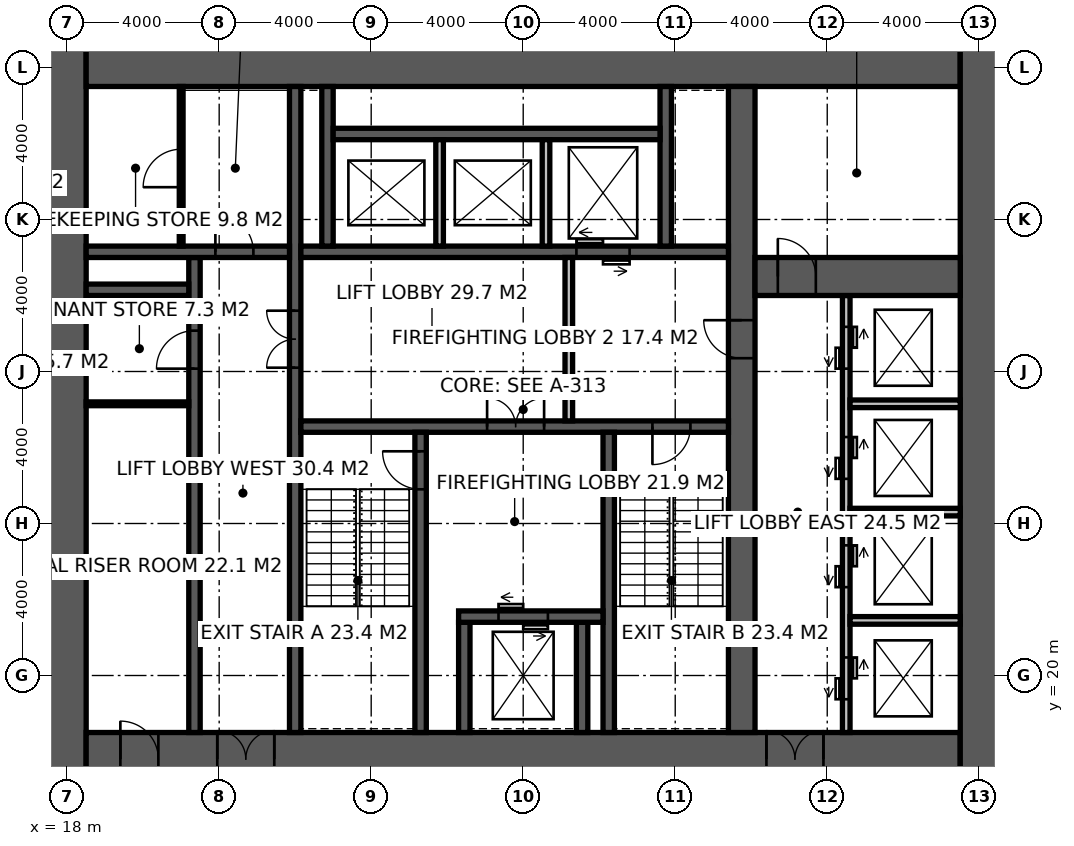
"""IFC4 building model, lengths in metres.
Left out: names, types, materials, properties, quantities, classifications, styles, units other than length and angle.
Written with IfcOpenShell. Run it as: python <this file> out.ifc"""

import sys

from ifc_helpers import new_model, si_unit, direction, frame, frame_2d, origin, place, context, subcontext, project, spatial, rectangle, extrude, element, fill, save


model = new_model("IFC4")
c1 = context("Model", 3, precision=1e-05, world=origin(), true_north=direction((0.0, 1.0)))
c2 = subcontext(c1, "Body", "Model", "MODEL_VIEW")
j1 = project(units=[si_unit("LENGTHUNIT", "METRE"), si_unit("PLANEANGLEUNIT", "RADIAN")], contexts=[c1])
p1 = place(None, origin())
s1 = spatial("IfcSite", under=j1, at=p1, CompositionType="ELEMENT")
p2 = place(p1, origin())
s2 = spatial("IfcBuilding", under=s1, at=p2, CompositionType="ELEMENT")
p3 = place(p2, frame((0.0, 0.0, 39.0)))
s3 = spatial("IfcBuildingStorey", under=s2, at=p3, CompositionType="ELEMENT", Elevation=39.0)
p4 = place(p3, frame((18.0, 17.1, -0.15), z_axis=(0.0, 0.0, 1.0), x_axis=(0.0, 1.0, 0.0)))
e1 = element("IfcWall", 1, at=p4, inside=s3, PredefinedType="SHEAR", context=c2, shape_type="SweptSolid", body=[
    extrude(rectangle(XDim=19.8, YDim=1.0, at=frame_2d((9.9, 0.0))), origin(), (0.0, 0.0, 1.0), 4.0),
])
p5 = place(p3, frame((18.5, 17.8, -0.15), z_axis=(0.0, 0.0, 1.0), x_axis=(1.0, 0.0, 0.0)))
e2 = element("IfcWall", 2, at=p5, inside=s3, PredefinedType="SHEAR", context=c2, shape_type="SweptSolid", body=[
    extrude(rectangle(XDim=23.0, YDim=1.4, at=frame_2d((11.5, 0.0))), origin(), (0.0, 0.0, 1.0), 4.0),
])
p6 = place(p5, frame((3.45, 0.0, 0.15)))
e3 = element("IfcOpeningElement", 3, at=p6, cuts=e2, PredefinedType="OPENING", context=c2, shape_type="SweptSolid", body=[
    extrude(rectangle(XDim=1.5, YDim=2.4, at=frame_2d((0.75, 1.2))), frame((0.0, 0.71, 0.0), z_axis=(0.0, -1.0, 0.0), x_axis=(1.0, 0.0, 0.0)), (0.0, 0.0, 1.0), 1.42),
])
p7 = place(p5, frame((17.9, 0.0, 0.15)))
e4 = element("IfcOpeningElement", 4, at=p7, cuts=e2, PredefinedType="OPENING", context=c2, shape_type="SweptSolid", body=[
    extrude(rectangle(XDim=1.5, YDim=2.4, at=frame_2d((0.75, 1.2))), frame((0.0, 0.71, 0.0), z_axis=(0.0, -1.0, 0.0), x_axis=(1.0, 0.0, 0.0)), (0.0, 0.0, 1.0), 1.42),
])
p8 = place(p5, frame((0.9, 0.0, 0.15)))
e5 = element("IfcOpeningElement", 5, at=p8, cuts=e2, PredefinedType="OPENING", context=c2, shape_type="SweptSolid", body=[
    extrude(rectangle(XDim=1.0, YDim=2.2, at=frame_2d((0.5, 1.1))), frame((0.0, 0.71, 0.0), z_axis=(0.0, -1.0, 0.0), x_axis=(1.0, 0.0, 0.0)), (0.0, 0.0, 1.0), 1.42),
])
p9 = place(p3, frame((18.5, 36.2, -0.15), z_axis=(0.0, 0.0, 1.0), x_axis=(1.0, 0.0, 0.0)))
e6 = element("IfcWall", 6, at=p9, inside=s3, PredefinedType="SHEAR", context=c2, shape_type="SweptSolid", body=[
    extrude(rectangle(XDim=23.0, YDim=1.4, at=frame_2d((11.5, 0.0))), origin(), (0.0, 0.0, 1.0), 4.0),
])
p10 = place(p3, frame((42.0, 17.1, -0.15), z_axis=(0.0, 0.0, 1.0), x_axis=(0.0, 1.0, 0.0)))
e7 = element("IfcWall", 7, at=p10, inside=s3, PredefinedType="SHEAR", context=c2, shape_type="SweptSolid", body=[
    extrude(rectangle(XDim=19.8, YDim=1.0, at=frame_2d((9.9, 0.0))), origin(), (0.0, 0.0, 1.0), 4.0),
])
p11 = place(p3, frame((35.75, 18.5, -0.15), z_axis=(0.0, 0.0, 1.0), x_axis=(0.0, 1.0, 0.0)))
e8 = element("IfcWall", 8, at=p11, inside=s3, PredefinedType="SHEAR", context=c2, shape_type="SweptSolid", body=[
    extrude(rectangle(XDim=17.0, YDim=0.7, at=frame_2d((8.5, 0.0))), origin(), (0.0, 0.0, 1.0), 4.0),
])
p12 = place(p11, frame((9.85, 0.0, 0.15)))
e9 = element("IfcOpeningElement", 9, at=p12, cuts=e8, PredefinedType="OPENING", context=c2, shape_type="SweptSolid", body=[
    extrude(rectangle(XDim=1.0, YDim=2.2, at=frame_2d((0.5, 1.1))), frame((0.0, 0.36, 0.0), z_axis=(0.0, -1.0, 0.0), x_axis=(1.0, 0.0, 0.0)), (0.0, 0.0, 1.0), 0.72),
])
p13 = place(p3, frame((24.0, 18.5, -0.15), z_axis=(0.0, 0.0, 1.0), x_axis=(0.0, 1.0, 0.0)))
e10 = element("IfcWall", 10, at=p13, inside=s3, PredefinedType="SHEAR", context=c2, shape_type="SweptSolid", body=[
    extrude(rectangle(XDim=17.0, YDim=0.3, at=frame_2d((8.5, 0.0))), origin(), (0.0, 0.0, 1.0), 4.0),
])
p14 = place(p13, frame((9.6, 0.0, 0.15)))
e11 = element("IfcOpeningElement", 11, at=p14, cuts=e10, PredefinedType="OPENING", context=c2, shape_type="SweptSolid", body=[
    extrude(rectangle(XDim=1.5, YDim=2.4, at=frame_2d((0.75, 1.2))), frame((0.0, 0.16, 0.0), z_axis=(0.0, -1.0, 0.0), x_axis=(1.0, 0.0, 0.0)), (0.0, 0.0, 1.0), 0.32),
])
p15 = place(p3, frame((24.15, 26.55, -0.15), z_axis=(0.0, 0.0, 1.0), x_axis=(1.0, 0.0, 0.0)))
e12 = element("IfcWall", 12, at=p15, inside=s3, PredefinedType="SHEAR", context=c2, shape_type="SweptSolid", body=[
    extrude(rectangle(XDim=11.25, YDim=0.3, at=frame_2d((5.625, 0.0))), origin(), (0.0, 0.0, 1.0), 4.0),
])
p16 = place(p15, frame((9.25, 0.0, 0.15)))
e13 = element("IfcOpeningElement", 13, at=p16, cuts=e12, PredefinedType="OPENING", context=c2, shape_type="SweptSolid", body=[
    extrude(rectangle(XDim=1.0, YDim=2.2, at=frame_2d((0.5, 1.1))), frame((0.0, 0.16, 0.0), z_axis=(0.0, -1.0, 0.0), x_axis=(1.0, 0.0, 0.0)), (0.0, 0.0, 1.0), 0.32),
])
p17 = place(p15, frame((4.9, 0.0, 0.15)))
e14 = element("IfcOpeningElement", 14, at=p17, cuts=e12, PredefinedType="OPENING", context=c2, shape_type="SweptSolid", body=[
    extrude(rectangle(XDim=1.5, YDim=2.4, at=frame_2d((0.75, 1.2))), frame((0.0, 0.16, 0.0), z_axis=(0.0, -1.0, 0.0), x_axis=(1.0, 0.0, 0.0)), (0.0, 0.0, 1.0), 0.32),
])
p18 = place(p3, frame((27.3, 18.5, -0.15), z_axis=(0.0, 0.0, 1.0), x_axis=(0.0, 1.0, 0.0)))
e15 = element("IfcWall", 15, at=p18, inside=s3, PredefinedType="SHEAR", context=c2, shape_type="SweptSolid", body=[
    extrude(rectangle(XDim=7.9, YDim=0.3, at=frame_2d((3.95, 0.0))), origin(), (0.0, 0.0, 1.0), 4.0),
])
p19 = place(p18, frame((6.4, 0.0, 0.15)))
e16 = element("IfcOpeningElement", 16, at=p19, cuts=e15, PredefinedType="OPENING", context=c2, shape_type="SweptSolid", body=[
    extrude(rectangle(XDim=1.0, YDim=2.2, at=frame_2d((0.5, 1.1))), frame((0.0, 0.16, 0.0), z_axis=(0.0, -1.0, 0.0), x_axis=(1.0, 0.0, 0.0)), (0.0, 0.0, 1.0), 0.32),
])
p20 = place(p3, frame((32.25, 18.5, -0.15), z_axis=(0.0, 0.0, 1.0), x_axis=(0.0, 1.0, 0.0)))
e17 = element("IfcWall", 17, at=p20, inside=s3, PredefinedType="SHEAR", context=c2, shape_type="SweptSolid", body=[
    extrude(rectangle(XDim=7.9, YDim=0.3, at=frame_2d((3.95, 0.0))), origin(), (0.0, 0.0, 1.0), 4.0),
])
for number, where, z_axis, x_axis in (
    (18, (28.45, 18.5, -0.15), (0.0, 0.0, 1.0), (0.0, 1.0, 0.0)),
    (19, (31.55, 18.5, -0.15), (0.0, 0.0, 1.0), (0.0, 1.0, 0.0)),
):
    element("IfcWall", number, at=place(p3, frame(where, z_axis=z_axis, x_axis=x_axis)), inside=s3, PredefinedType="SHEAR", context=c2, shape_type="SweptSolid", body=[
        extrude(rectangle(XDim=2.9, YDim=0.3, at=frame_2d((1.45, 0.0))), origin(), (0.0, 0.0, 1.0), 4.0),
    ])
p21 = place(p3, frame((28.3, 21.55, -0.15), z_axis=(0.0, 0.0, 1.0), x_axis=(1.0, 0.0, 0.0)))
e20 = element("IfcWall", 20, at=p21, inside=s3, PredefinedType="SHEAR", context=c2, shape_type="SweptSolid", body=[
    extrude(rectangle(XDim=3.8, YDim=0.3, at=frame_2d((1.9, 0.0))), origin(), (0.0, 0.0, 1.0), 4.0),
])
p22 = place(p21, frame((1.05, 0.0, 0.15)))
e21 = element("IfcOpeningElement", 21, at=p22, cuts=e20, PredefinedType="OPENING", context=c2, shape_type="SweptSolid", body=[
    extrude(rectangle(XDim=1.3, YDim=2.4, at=frame_2d((0.65, 1.2))), frame((0.0, 0.16, 0.0), z_axis=(0.0, -1.0, 0.0), x_axis=(1.0, 0.0, 0.0)), (0.0, 0.0, 1.0), 0.32),
])
p23 = place(p3, frame((24.15, 31.15, -0.15), z_axis=(0.0, 0.0, 1.0), x_axis=(1.0, 0.0, 0.0)))
e22 = element("IfcWall", 22, at=p23, inside=s3, PredefinedType="SHEAR", context=c2, shape_type="SweptSolid", body=[
    extrude(rectangle(XDim=11.25, YDim=0.3, at=frame_2d((5.625, 0.0))), origin(), (0.0, 0.0, 1.0), 4.0),
])
p24 = place(p23, frame((7.25, 0.0, 0.15)))
e23 = element("IfcOpeningElement", 23, at=p24, cuts=e22, PredefinedType="OPENING", context=c2, shape_type="SweptSolid", body=[
    extrude(rectangle(XDim=1.4, YDim=2.4, at=frame_2d((0.7, 1.2))), frame((0.0, 0.16, 0.0), z_axis=(0.0, -1.0, 0.0), x_axis=(1.0, 0.0, 0.0)), (0.0, 0.0, 1.0), 0.32),
])
p25 = place(p3, frame((21.35, 18.5, -0.15), z_axis=(0.0, 0.0, 1.0), x_axis=(0.0, 1.0, 0.0)))
e24 = element("IfcWall", 24, at=p25, inside=s3, PredefinedType="SHEAR", context=c2, shape_type="SweptSolid", body=[
    extrude(rectangle(XDim=12.5, YDim=0.3, at=frame_2d((6.25, 0.0))), origin(), (0.0, 0.0, 1.0), 4.0),
])
p26 = place(p25, frame((9.575, 0.0, 0.15)))
e25 = element("IfcOpeningElement", 25, at=p26, cuts=e24, PredefinedType="OPENING", context=c2, shape_type="SweptSolid", body=[
    extrude(rectangle(XDim=1.0, YDim=2.2, at=frame_2d((0.5, 1.1))), frame((0.0, 0.16, 0.0), z_axis=(0.0, -1.0, 0.0), x_axis=(1.0, 0.0, 0.0)), (0.0, 0.0, 1.0), 0.32),
])
p27 = place(p3, frame((18.5, 31.15, -0.15), z_axis=(0.0, 0.0, 1.0), x_axis=(1.0, 0.0, 0.0)))
e26 = element("IfcWall", 26, at=p27, inside=s3, PredefinedType="SHEAR", context=c2, shape_type="SweptSolid", body=[
    extrude(rectangle(XDim=5.35, YDim=0.3, at=frame_2d((2.675, 0.0))), origin(), (0.0, 0.0, 1.0), 4.0),
])
p28 = place(p27, frame((3.4, 0.0, 0.15)))
e27 = element("IfcOpeningElement", 27, at=p28, cuts=e26, PredefinedType="OPENING", context=c2, shape_type="SweptSolid", body=[
    extrude(rectangle(XDim=1.0, YDim=2.2, at=frame_2d((0.5, 1.1))), frame((0.0, 0.16, 0.0), z_axis=(0.0, -1.0, 0.0), x_axis=(1.0, 0.0, 0.0)), (0.0, 0.0, 1.0), 0.32),
])
p29 = place(p3, frame((18.5, 30.15, -0.15), z_axis=(0.0, 0.0, 1.0), x_axis=(1.0, 0.0, 0.0)))
e28 = element("IfcWall", 28, at=p29, inside=s3, PredefinedType="SHEAR", context=c2, shape_type="SweptSolid", body=[
    extrude(rectangle(XDim=2.7, YDim=0.3, at=frame_2d((1.35, 0.0))), origin(), (0.0, 0.0, 1.0), 4.0),
])
for number, where, z_axis, x_axis in (
    (29, (24.85, 31.3, -0.15), (0.0, 0.0, 1.0), (0.0, 1.0, 0.0)),
    (30, (33.75, 31.3, -0.15), (0.0, 0.0, 1.0), (0.0, 1.0, 0.0)),
):
    element("IfcWall", number, at=place(p3, frame(where, z_axis=z_axis, x_axis=x_axis)), inside=s3, PredefinedType="SHEAR", context=c2, shape_type="SweptSolid", body=[
        extrude(rectangle(XDim=4.2, YDim=0.3, at=frame_2d((2.1, 0.0))), origin(), (0.0, 0.0, 1.0), 4.0),
    ])
p30 = place(p3, frame((25.0, 34.25, -0.15), z_axis=(0.0, 0.0, 1.0), x_axis=(1.0, 0.0, 0.0)))
e31 = element("IfcWall", 31, at=p30, inside=s3, PredefinedType="SHEAR", context=c2, shape_type="SweptSolid", body=[
    extrude(rectangle(XDim=8.6, YDim=0.3, at=frame_2d((4.3, 0.0))), origin(), (0.0, 0.0, 1.0), 4.0),
])
for number, where, z_axis, x_axis in (
    (32, (27.8, 31.3, -0.15), (0.0, 0.0, 1.0), (0.0, 1.0, 0.0)),
    (33, (30.6, 31.3, -0.15), (0.0, 0.0, 1.0), (0.0, 1.0, 0.0)),
):
    element("IfcWall", number, at=place(p3, frame(where, z_axis=z_axis, x_axis=x_axis)), inside=s3, PredefinedType="SOLIDWALL", context=c2, shape_type="SweptSolid", body=[
        extrude(rectangle(XDim=2.8, YDim=0.2, at=frame_2d((1.4, 0.0))), origin(), (0.0, 0.0, 1.0), 4.0),
    ])
p31 = place(p3, frame((38.5, 18.5, -0.15), z_axis=(0.0, 0.0, 1.0), x_axis=(0.0, 1.0, 0.0)))
e34 = element("IfcWall", 34, at=p31, inside=s3, PredefinedType="SOLIDWALL", context=c2, shape_type="SweptSolid", body=[
    extrude(rectangle(XDim=11.5, YDim=0.2, at=frame_2d((5.75, 0.0))), origin(), (0.0, 0.0, 1.0), 4.0),
])
p32 = place(p31, frame((0.875, 0.0, 0.15)))
e35 = element("IfcOpeningElement", 35, at=p32, cuts=e34, PredefinedType="OPENING", context=c2, shape_type="SweptSolid", body=[
    extrude(rectangle(XDim=1.1, YDim=2.2, at=frame_2d((0.55, 1.1))), frame((0.0, 0.11, 0.0), z_axis=(0.0, -1.0, 0.0), x_axis=(1.0, 0.0, 0.0)), (0.0, 0.0, 1.0), 0.22),
])
p33 = place(p31, frame((3.825, 0.0, 0.15)))
e36 = element("IfcOpeningElement", 36, at=p33, cuts=e34, PredefinedType="OPENING", context=c2, shape_type="SweptSolid", body=[
    extrude(rectangle(XDim=1.1, YDim=2.2, at=frame_2d((0.55, 1.1))), frame((0.0, 0.11, 0.0), z_axis=(0.0, -1.0, 0.0), x_axis=(1.0, 0.0, 0.0)), (0.0, 0.0, 1.0), 0.22),
])
p34 = place(p31, frame((6.675, 0.0, 0.15)))
e37 = element("IfcOpeningElement", 37, at=p34, cuts=e34, PredefinedType="OPENING", context=c2, shape_type="SweptSolid", body=[
    extrude(rectangle(XDim=1.1, YDim=2.2, at=frame_2d((0.55, 1.1))), frame((0.0, 0.11, 0.0), z_axis=(0.0, -1.0, 0.0), x_axis=(1.0, 0.0, 0.0)), (0.0, 0.0, 1.0), 0.22),
])
p35 = place(p31, frame((9.575, 0.0, 0.15)))
e38 = element("IfcOpeningElement", 38, at=p35, cuts=e34, PredefinedType="OPENING", context=c2, shape_type="SweptSolid", body=[
    extrude(rectangle(XDim=1.1, YDim=2.2, at=frame_2d((0.55, 1.1))), frame((0.0, 0.11, 0.0), z_axis=(0.0, -1.0, 0.0), x_axis=(1.0, 0.0, 0.0)), (0.0, 0.0, 1.0), 0.22),
])
p36 = place(p3, frame((36.1, 30.5, -0.15), z_axis=(0.0, 0.0, 1.0), x_axis=(1.0, 0.0, 0.0)))
e39 = element("IfcWall", 39, at=p36, inside=s3, PredefinedType="SHEAR", context=c2, shape_type="SweptSolid", body=[
    extrude(rectangle(XDim=5.4, YDim=1.0, at=frame_2d((2.7, 0.0))), origin(), (0.0, 0.0, 1.0), 4.0),
])
p37 = place(p36, frame((0.6, 0.0, 0.15)))
e40 = element("IfcOpeningElement", 40, at=p37, cuts=e39, PredefinedType="OPENING", context=c2, shape_type="SweptSolid", body=[
    extrude(rectangle(XDim=1.0, YDim=2.2, at=frame_2d((0.5, 1.1))), frame((0.0, 0.51, 0.0), z_axis=(0.0, -1.0, 0.0), x_axis=(1.0, 0.0, 0.0)), (0.0, 0.0, 1.0), 1.02),
])
for number, where, z_axis, x_axis in (
    (41, (38.6, 21.45, -0.15), (0.0, 0.0, 1.0), (1.0, 0.0, 0.0)),
    (42, (38.6, 24.3, -0.15), (0.0, 0.0, 1.0), (1.0, 0.0, 0.0)),
    (43, (38.6, 27.15, -0.15), (0.0, 0.0, 1.0), (1.0, 0.0, 0.0)),
):
    element("IfcWall", number, at=place(p3, frame(where, z_axis=z_axis, x_axis=x_axis)), inside=s3, PredefinedType="SOLIDWALL", context=c2, shape_type="SweptSolid", body=[
        extrude(rectangle(XDim=2.9, YDim=0.2, at=frame_2d((1.45, 0.0))), origin(), (0.0, 0.0, 1.0), 4.0),
    ])
p38 = place(p3, frame((31.2, 26.7, 0.0), z_axis=(0.0, 0.0, 1.0), x_axis=(0.0, 1.0, 0.0)))
e44 = element("IfcWall", 44, at=p38, inside=s3, PredefinedType="SOLIDWALL", context=c2, shape_type="SweptSolid", body=[
    extrude(rectangle(XDim=4.3, YDim=0.2, at=frame_2d((2.15, 0.0))), origin(), (0.0, 0.0, 1.0), 3.85),
])
p39 = place(p3, frame((21.0, 31.3, 0.0), z_axis=(0.0, 0.0, 1.0), x_axis=(0.0, 1.0, 0.0)))
e45 = element("IfcWall", 45, at=p39, inside=s3, PredefinedType="PARTITIONING", context=c2, shape_type="SweptSolid", body=[
    extrude(rectangle(XDim=4.2, YDim=0.1, at=frame_2d((2.1, 0.0))), origin(), (0.0, 0.0, 1.0), 3.85),
])
p40 = place(p39, frame((1.55, 0.0, 0.0)))
e46 = element("IfcOpeningElement", 46, at=p40, cuts=e45, PredefinedType="OPENING", context=c2, shape_type="SweptSolid", body=[
    extrude(rectangle(XDim=1.0, YDim=2.2, at=frame_2d((0.5, 1.1))), frame((0.0, 0.06, 0.0), z_axis=(0.0, -1.0, 0.0), x_axis=(1.0, 0.0, 0.0)), (0.0, 0.0, 1.0), 0.12),
])
p41 = place(p3, frame((18.5, 27.15, 0.0), z_axis=(0.0, 0.0, 1.0), x_axis=(1.0, 0.0, 0.0)))
e47 = element("IfcWall", 47, at=p41, inside=s3, PredefinedType="PARTITIONING", context=c2, shape_type="SweptSolid", body=[
    extrude(rectangle(XDim=2.7, YDim=0.1, at=frame_2d((1.35, 0.0))), origin(), (0.0, 0.0, 1.0), 3.85),
])
p42 = place(p19, origin())
e48 = element("IfcDoor", 48, at=p42, inside=s3, OperationType="SINGLE_SWING_RIGHT", PredefinedType="DOOR", context=c2, shape_type="SweptSolid", body=[
    extrude(rectangle(XDim=1.0, YDim=2.2, at=frame_2d((0.5, 1.1))), frame((0.0, 0.025, 0.0), z_axis=(0.0, -1.0, 0.0), x_axis=(1.0, 0.0, 0.0)), (0.0, 0.0, 1.0), 0.05),
])
fill(e16, e48)
p43 = place(p16, frame((1.0, 0.0, 0.0), z_axis=(0.0, 0.0, 1.0), x_axis=(-1.0, 0.0, 0.0)))
e49 = element("IfcDoor", 49, at=p43, inside=s3, OperationType="SINGLE_SWING_RIGHT", PredefinedType="DOOR", context=c2, shape_type="SweptSolid", body=[
    extrude(rectangle(XDim=1.0, YDim=2.2, at=frame_2d((0.5, 1.1))), frame((0.0, 0.025, 0.0), z_axis=(0.0, -1.0, 0.0), x_axis=(1.0, 0.0, 0.0)), (0.0, 0.0, 1.0), 0.05),
])
fill(e13, e49)
p44 = place(p12, origin())
e50 = element("IfcDoor", 50, at=p44, inside=s3, OperationType="SINGLE_SWING_RIGHT", PredefinedType="DOOR", context=c2, shape_type="SweptSolid", body=[
    extrude(rectangle(XDim=1.0, YDim=2.2, at=frame_2d((0.5, 1.1))), frame((0.0, 0.025, 0.0), z_axis=(0.0, -1.0, 0.0), x_axis=(1.0, 0.0, 0.0)), (0.0, 0.0, 1.0), 0.05),
])
fill(e9, e50)
p45 = place(p17, origin())
e51 = element("IfcDoor", 51, at=p45, inside=s3, OperationType="DOUBLE_DOOR_DOUBLE_SWING", PredefinedType="DOOR", context=c2, shape_type="SweptSolid", body=[
    extrude(rectangle(XDim=1.5, YDim=2.4, at=frame_2d((0.75, 1.2))), frame((0.0, 0.025, 0.0), z_axis=(0.0, -1.0, 0.0), x_axis=(1.0, 0.0, 0.0)), (0.0, 0.0, 1.0), 0.05),
])
fill(e14, e51)
p46 = place(p14, origin())
e52 = element("IfcDoor", 52, at=p46, inside=s3, OperationType="DOUBLE_DOOR_DOUBLE_SWING", PredefinedType="DOOR", context=c2, shape_type="SweptSolid", body=[
    extrude(rectangle(XDim=1.5, YDim=2.4, at=frame_2d((0.75, 1.2))), frame((0.0, 0.025, 0.0), z_axis=(0.0, -1.0, 0.0), x_axis=(1.0, 0.0, 0.0)), (0.0, 0.0, 1.0), 0.05),
])
fill(e11, e52)
p47 = place(p28, origin())
e53 = element("IfcDoor", 53, at=p47, inside=s3, OperationType="SINGLE_SWING_LEFT", PredefinedType="DOOR", context=c2, shape_type="SweptSolid", body=[
    extrude(rectangle(XDim=1.0, YDim=2.2, at=frame_2d((0.5, 1.1))), frame((0.0, 0.025, 0.0), z_axis=(0.0, -1.0, 0.0), x_axis=(1.0, 0.0, 0.0)), (0.0, 0.0, 1.0), 0.05),
])
fill(e27, e53)
p48 = place(p40, origin())
e54 = element("IfcDoor", 54, at=p48, inside=s3, OperationType="SINGLE_SWING_LEFT", PredefinedType="DOOR", context=c2, shape_type="SweptSolid", body=[
    extrude(rectangle(XDim=1.0, YDim=2.2, at=frame_2d((0.5, 1.1))), frame((0.0, 0.025, 0.0), z_axis=(0.0, -1.0, 0.0), x_axis=(1.0, 0.0, 0.0)), (0.0, 0.0, 1.0), 0.05),
])
fill(e46, e54)
p49 = place(p26, origin())
e55 = element("IfcDoor", 55, at=p49, inside=s3, OperationType="SINGLE_SWING_LEFT", PredefinedType="DOOR", context=c2, shape_type="SweptSolid", body=[
    extrude(rectangle(XDim=1.0, YDim=2.2, at=frame_2d((0.5, 1.1))), frame((0.0, 0.025, 0.0), z_axis=(0.0, -1.0, 0.0), x_axis=(1.0, 0.0, 0.0)), (0.0, 0.0, 1.0), 0.05),
])
fill(e25, e55)
p50 = place(p6, origin())
e56 = element("IfcDoor", 56, at=p50, inside=s3, OperationType="DOUBLE_DOOR_DOUBLE_SWING", PredefinedType="DOOR", context=c2, shape_type="SweptSolid", body=[
    extrude(rectangle(XDim=1.5, YDim=2.4, at=frame_2d((0.75, 1.2))), frame((0.0, 0.025, 0.0), z_axis=(0.0, -1.0, 0.0), x_axis=(1.0, 0.0, 0.0)), (0.0, 0.0, 1.0), 0.05),
])
fill(e3, e56)
p51 = place(p7, origin())
e57 = element("IfcDoor", 57, at=p51, inside=s3, OperationType="DOUBLE_DOOR_DOUBLE_SWING", PredefinedType="DOOR", context=c2, shape_type="SweptSolid", body=[
    extrude(rectangle(XDim=1.5, YDim=2.4, at=frame_2d((0.75, 1.2))), frame((0.0, 0.025, 0.0), z_axis=(0.0, -1.0, 0.0), x_axis=(1.0, 0.0, 0.0)), (0.0, 0.0, 1.0), 0.05),
])
fill(e4, e57)
p52 = place(p37, origin())
e58 = element("IfcDoor", 58, at=p52, inside=s3, OperationType="SINGLE_SWING_LEFT", PredefinedType="DOOR", context=c2, shape_type="SweptSolid", body=[
    extrude(rectangle(XDim=1.0, YDim=2.2, at=frame_2d((0.5, 1.1))), frame((0.0, 0.025, 0.0), z_axis=(0.0, -1.0, 0.0), x_axis=(1.0, 0.0, 0.0)), (0.0, 0.0, 1.0), 0.05),
])
fill(e40, e58)
p53 = place(p8, origin())
e59 = element("IfcDoor", 59, at=p53, inside=s3, OperationType="SINGLE_SWING_LEFT", PredefinedType="DOOR", context=c2, shape_type="SweptSolid", body=[
    extrude(rectangle(XDim=1.0, YDim=2.2, at=frame_2d((0.5, 1.1))), frame((0.0, 0.025, 0.0), z_axis=(0.0, -1.0, 0.0), x_axis=(1.0, 0.0, 0.0)), (0.0, 0.0, 1.0), 0.05),
])
fill(e5, e59)
p54 = place(p22, origin())
e60 = element("IfcDoor", 60, at=p54, inside=s3, OperationType="DOUBLE_DOOR_SLIDING", PredefinedType="DOOR", context=c2, shape_type="SweptSolid", body=[
    extrude(rectangle(XDim=1.3, YDim=2.4, at=frame_2d((0.65, 1.2))), frame((0.0, 0.025, 0.0), z_axis=(0.0, -1.0, 0.0), x_axis=(1.0, 0.0, 0.0)), (0.0, 0.0, 1.0), 0.05),
])
fill(e21, e60)
p55 = place(p24, origin())
e61 = element("IfcDoor", 61, at=p55, inside=s3, OperationType="DOUBLE_DOOR_SLIDING", PredefinedType="DOOR", context=c2, shape_type="SweptSolid", body=[
    extrude(rectangle(XDim=1.4, YDim=2.4, at=frame_2d((0.7, 1.2))), frame((0.0, 0.025, 0.0), z_axis=(0.0, -1.0, 0.0), x_axis=(1.0, 0.0, 0.0)), (0.0, 0.0, 1.0), 0.05),
])
fill(e23, e61)
p56 = place(p32, origin())
e62 = element("IfcDoor", 62, at=p56, inside=s3, OperationType="DOUBLE_DOOR_SLIDING", PredefinedType="DOOR", context=c2, shape_type="SweptSolid", body=[
    extrude(rectangle(XDim=1.1, YDim=2.2, at=frame_2d((0.55, 1.1))), frame((0.0, 0.025, 0.0), z_axis=(0.0, -1.0, 0.0), x_axis=(1.0, 0.0, 0.0)), (0.0, 0.0, 1.0), 0.05),
])
fill(e35, e62)
p57 = place(p33, origin())
e63 = element("IfcDoor", 63, at=p57, inside=s3, OperationType="DOUBLE_DOOR_SLIDING", PredefinedType="DOOR", context=c2, shape_type="SweptSolid", body=[
    extrude(rectangle(XDim=1.1, YDim=2.2, at=frame_2d((0.55, 1.1))), frame((0.0, 0.025, 0.0), z_axis=(0.0, -1.0, 0.0), x_axis=(1.0, 0.0, 0.0)), (0.0, 0.0, 1.0), 0.05),
])
fill(e36, e63)
p58 = place(p34, origin())
e64 = element("IfcDoor", 64, at=p58, inside=s3, OperationType="DOUBLE_DOOR_SLIDING", PredefinedType="DOOR", context=c2, shape_type="SweptSolid", body=[
    extrude(rectangle(XDim=1.1, YDim=2.2, at=frame_2d((0.55, 1.1))), frame((0.0, 0.025, 0.0), z_axis=(0.0, -1.0, 0.0), x_axis=(1.0, 0.0, 0.0)), (0.0, 0.0, 1.0), 0.05),
])
fill(e37, e64)
p59 = place(p35, origin())
e65 = element("IfcDoor", 65, at=p59, inside=s3, OperationType="DOUBLE_DOOR_SLIDING", PredefinedType="DOOR", context=c2, shape_type="SweptSolid", body=[
    extrude(rectangle(XDim=1.1, YDim=2.2, at=frame_2d((0.55, 1.1))), frame((0.0, 0.025, 0.0), z_axis=(0.0, -1.0, 0.0), x_axis=(1.0, 0.0, 0.0)), (0.0, 0.0, 1.0), 0.05),
])
fill(e38, e65)
save(model, sys.argv[1])
